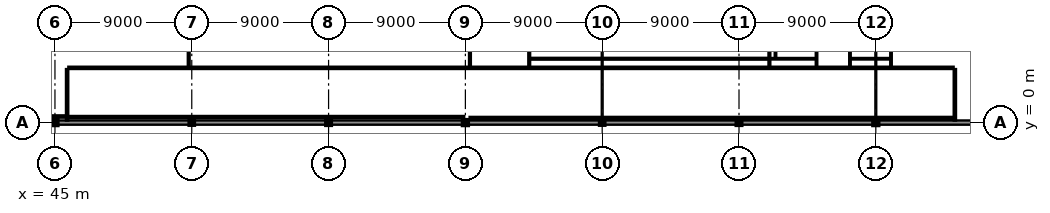
"""IFC4 building model, lengths in metres.
Left out: names, types, materials, properties, quantities, classifications, styles, units other than length and angle.
Written with IfcOpenShell. Run it as: python <this file> out.ifc"""

import sys

from ifc_helpers import new_model, si_unit, direction, frame, frame_2d, origin, origin_2d, place, context, subcontext, project, spatial, rectangle, i_section, extrude, element, fill, save


model = new_model("IFC4")
c1 = context("Model", 3, precision=1e-05, world=origin(), true_north=direction((0.0, 1.0)))
c2 = subcontext(c1, "Body", "Model", "MODEL_VIEW")
j1 = project(units=[si_unit("LENGTHUNIT", "METRE"), si_unit("PLANEANGLEUNIT", "RADIAN")], contexts=[c1])
p1 = place(None, origin())
s1 = spatial("IfcSite", under=j1, at=p1, CompositionType="ELEMENT")
p2 = place(p1, origin())
s2 = spatial("IfcBuilding", under=s1, at=p2, CompositionType="ELEMENT")
p3 = place(p2, frame((0.0, 0.0, 31.4)))
s3 = spatial("IfcBuildingStorey", under=s2, at=p3, CompositionType="ELEMENT", Elevation=31.4)
p4 = place(p3, frame((45.0, 0.0, 0.0), z_axis=(0.0, 0.0, 1.0), x_axis=(0.0, 1.0, 0.0)))
e1 = element("IfcColumn", 1, at=p4, inside=s3, PredefinedType="COLUMN", context=c2, shape_type="SweptSolid", body=[
    extrude(i_section(OverallWidth=0.3, OverallDepth=0.3, WebThickness=0.011, FlangeThickness=0.019, at=origin_2d()), origin(), (0.0, 0.0, 1.0), 4.0),
])
p5 = place(p3, frame((54.0, 0.0, 0.0), z_axis=(0.0, 0.0, 1.0), x_axis=(1.0, 0.0, 0.0)))
e2 = element("IfcColumn", 2, at=p5, inside=s3, PredefinedType="COLUMN", context=c2, shape_type="SweptSolid", body=[
    extrude(i_section(OverallWidth=0.26, OverallDepth=0.26, WebThickness=0.01, FlangeThickness=0.018, at=origin_2d()), origin(), (0.0, 0.0, 1.0), 4.0),
])
p6 = place(p3, frame((63.0, 0.0, 0.0), z_axis=(0.0, 0.0, 1.0), x_axis=(1.0, 0.0, 0.0)))
e3 = element("IfcColumn", 3, at=p6, inside=s3, PredefinedType="COLUMN", context=c2, shape_type="SweptSolid", body=[
    extrude(i_section(OverallWidth=0.28, OverallDepth=0.28, WebThickness=0.01, FlangeThickness=0.018, at=origin_2d()), origin(), (0.0, 0.0, 1.0), 4.0),
])
p7 = place(p3, frame((72.0, 0.0, 0.0), z_axis=(0.0, 0.0, 1.0), x_axis=(1.0, 0.0, 0.0)))
e4 = element("IfcColumn", 4, at=p7, inside=s3, PredefinedType="COLUMN", context=c2, shape_type="SweptSolid", body=[
    extrude(i_section(OverallWidth=0.3, OverallDepth=0.3, WebThickness=0.011, FlangeThickness=0.019, at=origin_2d()), origin(), (0.0, 0.0, 1.0), 4.0),
])
p8 = place(p3, frame((81.0, 0.0, 0.0), z_axis=(0.0, 0.0, 1.0), x_axis=(1.0, 0.0, 0.0)))
e5 = element("IfcColumn", 5, at=p8, inside=s3, PredefinedType="COLUMN", context=c2, shape_type="SweptSolid", body=[
    extrude(i_section(OverallWidth=0.26, OverallDepth=0.26, WebThickness=0.01, FlangeThickness=0.018, at=origin_2d()), origin(), (0.0, 0.0, 1.0), 4.0),
])
p9 = place(p3, frame((90.0, 0.0, 0.0), z_axis=(0.0, 0.0, 1.0), x_axis=(0.0, 1.0, 0.0)))
e6 = element("IfcColumn", 6, at=p9, inside=s3, PredefinedType="COLUMN", context=c2, shape_type="SweptSolid", body=[
    extrude(i_section(OverallWidth=0.28, OverallDepth=0.28, WebThickness=0.01, FlangeThickness=0.018, at=origin_2d()), origin(), (0.0, 0.0, 1.0), 4.0),
])
p10 = place(p3, frame((99.0, 0.0, 0.0), z_axis=(0.0, 0.0, 1.0), x_axis=(1.0, 0.0, 0.0)))
e7 = element("IfcColumn", 7, at=p10, inside=s3, PredefinedType="COLUMN", context=c2, shape_type="SweptSolid", body=[
    extrude(i_section(OverallWidth=0.3, OverallDepth=0.3, WebThickness=0.011, FlangeThickness=0.019, at=origin_2d()), origin(), (0.0, 0.0, 1.0), 4.0),
])
p11 = place(p3, frame((35.99, 0.0, 0.0), z_axis=(0.0, 0.0, 1.0), x_axis=(1.0, 0.0, 0.0)))
e8 = element("IfcWall", 8, at=p11, inside=s3, PredefinedType="SOLIDWALL", context=c2, shape_type="SweptSolid", body=[
    extrude(rectangle(XDim=8.862, YDim=0.28, at=frame_2d((4.431, 0.0))), origin(), (0.0, 0.0, 1.0), 2.787),
])
p12 = place(p3, frame((45.148, 0.0, 0.0), z_axis=(0.0, 0.0, 1.0), x_axis=(1.0, 0.0, 0.0)))
e9 = element("IfcWall", 9, at=p12, inside=s3, PredefinedType="SOLIDWALL", context=c2, shape_type="SweptSolid", body=[
    extrude(rectangle(XDim=8.844, YDim=0.28, at=frame_2d((4.422, 0.0))), origin(), (0.0, 0.0, 1.0), 2.787),
])
p13 = place(p12, frame((2.003, 0.0, 1.05)))
e10 = element("IfcOpeningElement", 10, at=p13, cuts=e9, PredefinedType="OPENING", context=c2, shape_type="SweptSolid", body=[
    extrude(rectangle(XDim=1.3, YDim=1.3, at=frame_2d((0.65, 0.65))), frame((0.0, 0.155, 0.0), z_axis=(0.0, -1.0, 0.0), x_axis=(1.0, 0.0, 0.0)), (0.0, 0.0, 1.0), 0.31),
])
p14 = place(p12, frame((5.541, 0.0, 1.05)))
e11 = element("IfcOpeningElement", 11, at=p14, cuts=e9, PredefinedType="OPENING", context=c2, shape_type="SweptSolid", body=[
    extrude(rectangle(XDim=1.3, YDim=1.3, at=frame_2d((0.65, 0.65))), frame((0.0, 0.155, 0.0), z_axis=(0.0, -1.0, 0.0), x_axis=(1.0, 0.0, 0.0)), (0.0, 0.0, 1.0), 0.31),
])
p15 = place(p3, frame((54.008, 0.0, 0.0), z_axis=(0.0, 0.0, 1.0), x_axis=(1.0, 0.0, 0.0)))
e12 = element("IfcWall", 12, at=p15, inside=s3, PredefinedType="SOLIDWALL", context=c2, shape_type="SweptSolid", body=[
    extrude(rectangle(XDim=8.984, YDim=0.28, at=frame_2d((4.492, 0.0))), origin(), (0.0, 0.0, 1.0), 2.787),
])
p16 = place(p15, frame((2.045, 0.0, 1.05)))
e13 = element("IfcOpeningElement", 13, at=p16, cuts=e12, PredefinedType="OPENING", context=c2, shape_type="SweptSolid", body=[
    extrude(rectangle(XDim=1.3, YDim=1.3, at=frame_2d((0.65, 0.65))), frame((0.0, 0.155, 0.0), z_axis=(0.0, -1.0, 0.0), x_axis=(1.0, 0.0, 0.0)), (0.0, 0.0, 1.0), 0.31),
])
p17 = place(p15, frame((5.639, 0.0, 1.05)))
e14 = element("IfcOpeningElement", 14, at=p17, cuts=e12, PredefinedType="OPENING", context=c2, shape_type="SweptSolid", body=[
    extrude(rectangle(XDim=1.3, YDim=1.3, at=frame_2d((0.65, 0.65))), frame((0.0, 0.155, 0.0), z_axis=(0.0, -1.0, 0.0), x_axis=(1.0, 0.0, 0.0)), (0.0, 0.0, 1.0), 0.31),
])
p18 = place(p3, frame((63.008, 0.0, 0.0), z_axis=(0.0, 0.0, 1.0), x_axis=(1.0, 0.0, 0.0)))
e15 = element("IfcWall", 15, at=p18, inside=s3, PredefinedType="SOLIDWALL", context=c2, shape_type="SweptSolid", body=[
    extrude(rectangle(XDim=8.984, YDim=0.28, at=frame_2d((4.492, 0.0))), origin(), (0.0, 0.0, 1.0), 2.787),
])
p19 = place(p18, frame((2.045, 0.0, 1.05)))
e16 = element("IfcOpeningElement", 16, at=p19, cuts=e15, PredefinedType="OPENING", context=c2, shape_type="SweptSolid", body=[
    extrude(rectangle(XDim=1.3, YDim=1.3, at=frame_2d((0.65, 0.65))), frame((0.0, 0.155, 0.0), z_axis=(0.0, -1.0, 0.0), x_axis=(1.0, 0.0, 0.0)), (0.0, 0.0, 1.0), 0.31),
])
p20 = place(p18, frame((5.639, 0.0, 1.05)))
e17 = element("IfcOpeningElement", 17, at=p20, cuts=e15, PredefinedType="OPENING", context=c2, shape_type="SweptSolid", body=[
    extrude(rectangle(XDim=1.3, YDim=1.3, at=frame_2d((0.65, 0.65))), frame((0.0, 0.155, 0.0), z_axis=(0.0, -1.0, 0.0), x_axis=(1.0, 0.0, 0.0)), (0.0, 0.0, 1.0), 0.31),
])
p21 = place(p3, frame((72.008, 0.0, 0.0), z_axis=(0.0, 0.0, 1.0), x_axis=(1.0, 0.0, 0.0)))
e18 = element("IfcWall", 18, at=p21, inside=s3, PredefinedType="SOLIDWALL", context=c2, shape_type="SweptSolid", body=[
    extrude(rectangle(XDim=8.934, YDim=0.28, at=frame_2d((4.467, 0.0))), origin(), (0.0, 0.0, 1.0), 3.355),
])
p22 = place(p21, frame((2.03, 0.0, 1.05)))
e19 = element("IfcOpeningElement", 19, at=p22, cuts=e18, PredefinedType="OPENING", context=c2, shape_type="SweptSolid", body=[
    extrude(rectangle(XDim=1.3, YDim=1.3, at=frame_2d((0.65, 0.65))), frame((0.0, 0.155, 0.0), z_axis=(0.0, -1.0, 0.0), x_axis=(1.0, 0.0, 0.0)), (0.0, 0.0, 1.0), 0.31),
])
p23 = place(p21, frame((5.604, 0.0, 1.05)))
e20 = element("IfcOpeningElement", 20, at=p23, cuts=e18, PredefinedType="OPENING", context=c2, shape_type="SweptSolid", body=[
    extrude(rectangle(XDim=1.3, YDim=1.3, at=frame_2d((0.65, 0.65))), frame((0.0, 0.155, 0.0), z_axis=(0.0, -1.0, 0.0), x_axis=(1.0, 0.0, 0.0)), (0.0, 0.0, 1.0), 0.31),
])
p24 = place(p3, frame((81.058, 0.0, 0.0), z_axis=(0.0, 0.0, 1.0), x_axis=(1.0, 0.0, 0.0)))
e21 = element("IfcWall", 21, at=p24, inside=s3, PredefinedType="SOLIDWALL", context=c2, shape_type="SweptSolid", body=[
    extrude(rectangle(XDim=8.804, YDim=0.28, at=frame_2d((4.402, 0.0))), origin(), (0.0, 0.0, 1.0), 3.355),
])
p25 = place(p24, frame((1.991, 0.0, 1.05)))
e22 = element("IfcOpeningElement", 22, at=p25, cuts=e21, PredefinedType="OPENING", context=c2, shape_type="SweptSolid", body=[
    extrude(rectangle(XDim=1.3, YDim=1.3, at=frame_2d((0.65, 0.65))), frame((0.0, 0.155, 0.0), z_axis=(0.0, -1.0, 0.0), x_axis=(1.0, 0.0, 0.0)), (0.0, 0.0, 1.0), 0.31),
])
p26 = place(p24, frame((5.513, 0.0, 1.05)))
e23 = element("IfcOpeningElement", 23, at=p26, cuts=e21, PredefinedType="OPENING", context=c2, shape_type="SweptSolid", body=[
    extrude(rectangle(XDim=1.3, YDim=1.3, at=frame_2d((0.65, 0.65))), frame((0.0, 0.155, 0.0), z_axis=(0.0, -1.0, 0.0), x_axis=(1.0, 0.0, 0.0)), (0.0, 0.0, 1.0), 0.31),
])
p27 = place(p3, frame((90.138, 0.0, 0.0), z_axis=(0.0, 0.0, 1.0), x_axis=(1.0, 0.0, 0.0)))
e24 = element("IfcWall", 24, at=p27, inside=s3, PredefinedType="SOLIDWALL", context=c2, shape_type="SweptSolid", body=[
    extrude(rectangle(XDim=8.804, YDim=0.28, at=frame_2d((4.402, 0.0))), origin(), (0.0, 0.0, 1.0), 3.355),
])
p28 = place(p27, frame((1.991, 0.0, 1.05)))
e25 = element("IfcOpeningElement", 25, at=p28, cuts=e24, PredefinedType="OPENING", context=c2, shape_type="SweptSolid", body=[
    extrude(rectangle(XDim=1.3, YDim=1.3, at=frame_2d((0.65, 0.65))), frame((0.0, 0.155, 0.0), z_axis=(0.0, -1.0, 0.0), x_axis=(1.0, 0.0, 0.0)), (0.0, 0.0, 1.0), 0.31),
])
p29 = place(p27, frame((5.513, 0.0, 1.05)))
e26 = element("IfcOpeningElement", 26, at=p29, cuts=e24, PredefinedType="OPENING", context=c2, shape_type="SweptSolid", body=[
    extrude(rectangle(XDim=1.3, YDim=1.3, at=frame_2d((0.65, 0.65))), frame((0.0, 0.155, 0.0), z_axis=(0.0, -1.0, 0.0), x_axis=(1.0, 0.0, 0.0)), (0.0, 0.0, 1.0), 0.31),
])
p30 = place(p3, frame((99.058, 0.0, 0.0), z_axis=(0.0, 0.0, 1.0), x_axis=(1.0, 0.0, 0.0)))
e27 = element("IfcWall", 27, at=p30, inside=s3, PredefinedType="SOLIDWALL", context=c2, shape_type="SweptSolid", body=[
    extrude(rectangle(XDim=8.934, YDim=0.28, at=frame_2d((4.467, 0.0))), origin(), (0.0, 0.0, 1.0), 3.355),
])
p31 = place(p30, frame((2.03, 0.0, 1.05)))
e28 = element("IfcOpeningElement", 28, at=p31, cuts=e27, PredefinedType="OPENING", context=c2, shape_type="SweptSolid", body=[
    extrude(rectangle(XDim=1.3, YDim=1.3, at=frame_2d((0.65, 0.65))), frame((0.0, 0.155, 0.0), z_axis=(0.0, -1.0, 0.0), x_axis=(1.0, 0.0, 0.0)), (0.0, 0.0, 1.0), 0.31),
])
p32 = place(p30, frame((5.604, 0.0, 1.05)))
e29 = element("IfcOpeningElement", 29, at=p32, cuts=e27, PredefinedType="OPENING", context=c2, shape_type="SweptSolid", body=[
    extrude(rectangle(XDim=1.3, YDim=1.3, at=frame_2d((0.65, 0.65))), frame((0.0, 0.155, 0.0), z_axis=(0.0, -1.0, 0.0), x_axis=(1.0, 0.0, 0.0)), (0.0, 0.0, 1.0), 0.31),
])
p33 = place(p3, frame((71.92, 0.36, 0.0), z_axis=(0.0, 0.0, 1.0), x_axis=(-1.0, 0.0, 0.0)))
e30 = element("IfcWall", 30, at=p33, inside=s3, PredefinedType="PARTITIONING", context=c2, shape_type="SweptSolid", body=[
    extrude(rectangle(XDim=26.04, YDim=0.15, at=frame_2d((13.02, 0.0))), origin(), (0.0, 0.0, 1.0), 3.64),
])
p34 = place(p3, frame((45.8, 0.135, 0.0), z_axis=(0.0, 0.0, 1.0), x_axis=(0.0, 1.0, 0.0)))
e31 = element("IfcWall", 31, at=p34, inside=s3, PredefinedType="PARTITIONING", context=c2, shape_type="SweptSolid", body=[
    extrude(rectangle(XDim=3.385, YDim=0.15, at=frame_2d((1.692, 0.0))), origin(), (0.0, 0.0, 1.0), 3.64),
])
p35 = place(p3, frame((45.88, 3.6, 0.0), z_axis=(0.0, 0.0, 1.0), x_axis=(1.0, 0.0, 0.0)))
e32 = element("IfcWall", 32, at=p35, inside=s3, PredefinedType="PARTITIONING", context=c2, shape_type="SweptSolid", body=[
    extrude(rectangle(XDim=58.24, YDim=0.15, at=frame_2d((29.12, 0.0))), origin(), (0.0, 0.0, 1.0), 3.64),
])
p36 = place(p35, frame((27.795, 0.0, 0.0)))
e33 = element("IfcOpeningElement", 33, at=p36, cuts=e32, PredefinedType="OPENING", context=c2, shape_type="SweptSolid", body=[
    extrude(rectangle(XDim=1.05, YDim=2.25, at=frame_2d((0.525, 1.125))), frame((0.0, 0.09, 0.0), z_axis=(0.0, -1.0, 0.0), x_axis=(1.0, 0.0, 0.0)), (0.0, 0.0, 1.0), 0.18),
])
p37 = place(p3, frame((104.2, 3.52, 0.0), z_axis=(0.0, 0.0, 1.0), x_axis=(0.0, -1.0, 0.0)))
e34 = element("IfcWall", 34, at=p37, inside=s3, PredefinedType="PARTITIONING", context=c2, shape_type="SweptSolid", body=[
    extrude(rectangle(XDim=3.385, YDim=0.15, at=frame_2d((1.692, 0.0))), origin(), (0.0, 0.0, 1.0), 3.64),
])
p38 = place(p3, frame((104.13, 0.3, 0.0), z_axis=(0.0, 0.0, 1.0), x_axis=(-1.0, 0.0, 0.0)))
e35 = element("IfcWall", 35, at=p38, inside=s3, PredefinedType="PARTITIONING", context=c2, shape_type="SweptSolid", body=[
    extrude(rectangle(XDim=31.851, YDim=0.15, at=frame_2d((15.925, 0.0))), origin(), (0.0, 0.0, 1.0), 3.64),
])
p39 = place(p3, frame((53.8, 12.62, 0.0), z_axis=(0.0, 0.0, 1.0), x_axis=(0.0, -1.0, 0.0)))
e36 = element("IfcWall", 36, at=p39, inside=s3, PredefinedType="PARTITIONING", context=c2, shape_type="SweptSolid", body=[
    extrude(rectangle(XDim=8.95, YDim=0.12, at=frame_2d((4.475, 0.0))), origin(), (0.0, 0.0, 1.0), 3.355),
])
p40 = place(p3, frame((45.73, 0.4, 0.0), z_axis=(0.0, 0.0, 1.0), x_axis=(-1.0, 0.0, 0.0)))
e37 = element("IfcWall", 37, at=p40, inside=s3, PredefinedType="PARTITIONING", context=c2, shape_type="SweptSolid", body=[
    extrude(rectangle(XDim=13.195, YDim=0.15, at=frame_2d((6.598, 0.0))), origin(), (0.0, 0.0, 1.0), 3.64),
])
p41 = place(p3, frame((72.3, 11.42, 0.0), z_axis=(0.0, 0.0, 1.0), x_axis=(0.0, -1.0, 0.0)))
e38 = element("IfcWall", 38, at=p41, inside=s3, PredefinedType="PARTITIONING", context=c2, shape_type="SweptSolid", body=[
    extrude(rectangle(XDim=7.75, YDim=0.12, at=frame_2d((3.875, 0.0))), origin(), (0.0, 0.0, 1.0), 3.64),
])
p42 = place(p41, frame((3.425, 0.0, 0.0)))
e39 = element("IfcOpeningElement", 39, at=p42, cuts=e38, PredefinedType="OPENING", context=c2, shape_type="SweptSolid", body=[
    extrude(rectangle(XDim=0.9, YDim=2.1, at=frame_2d((0.45, 1.05))), frame((0.0, 0.075, 0.0), z_axis=(0.0, -1.0, 0.0), x_axis=(1.0, 0.0, 0.0)), (0.0, 0.0, 1.0), 0.15),
])
p43 = place(p3, frame((91.92, 4.2, 0.0), z_axis=(0.0, 0.0, 1.0), x_axis=(-1.0, 0.0, 0.0)))
e40 = element("IfcWall", 40, at=p43, inside=s3, PredefinedType="PARTITIONING", context=c2, shape_type="SweptSolid", body=[
    extrude(rectangle(XDim=15.64, YDim=0.12, at=frame_2d((7.82, 0.0))), origin(), (0.0, 0.0, 1.0), 3.64),
])
for number, where, z_axis, x_axis in (
    (41, (76.2, 3.67, 0.0), (0.0, 0.0, 1.0), (0.0, 1.0, 0.0)),
    (42, (92.0, 15.32, 0.0), (0.0, 0.0, 1.0), (0.0, -1.0, 0.0)),
):
    element("IfcWall", number, at=place(p3, frame(where, z_axis=z_axis, x_axis=x_axis)), inside=s3, PredefinedType="PARTITIONING", context=c2, shape_type="SweptSolid", body=[
        extrude(rectangle(XDim=11.65, YDim=0.12, at=frame_2d((5.825, 0.0))), origin(), (0.0, 0.0, 1.0), 3.64),
    ])
p44 = place(p3, frame((95.02, 4.2, 0.0), z_axis=(0.0, 0.0, 1.0), x_axis=(-1.0, 0.0, 0.0)))
e43 = element("IfcWall", 43, at=p44, inside=s3, PredefinedType="PARTITIONING", context=c2, shape_type="SweptSolid", body=[
    extrude(rectangle(XDim=2.965, YDim=0.1, at=frame_2d((1.482, 0.0))), origin(), (0.0, 0.0, 1.0), 3.64),
])
p45 = place(p3, frame((92.4, 4.245, 0.0), z_axis=(0.0, 0.0, 1.0), x_axis=(0.0, 1.0, 0.0)))
e44 = element("IfcWall", 44, at=p45, inside=s3, PredefinedType="PARTITIONING", context=c2, shape_type="SweptSolid", body=[
    extrude(rectangle(XDim=5.475, YDim=0.1, at=frame_2d((2.737, 0.0))), origin(), (0.0, 0.0, 1.0), 3.64),
])
p46 = place(p3, frame((95.1, 9.72, 0.0), z_axis=(0.0, 0.0, 1.0), x_axis=(0.0, -1.0, 0.0)))
e45 = element("IfcWall", 45, at=p46, inside=s3, PredefinedType="PARTITIONING", context=c2, shape_type="SweptSolid", body=[
    extrude(rectangle(XDim=6.05, YDim=0.1, at=frame_2d((3.025, 0.0))), origin(), (0.0, 0.0, 1.0), 3.64),
])
p47 = place(p46, frame((2.529, 0.0, 0.0)))
e46 = element("IfcOpeningElement", 46, at=p47, cuts=e45, PredefinedType="OPENING", context=c2, shape_type="SweptSolid", body=[
    extrude(rectangle(XDim=0.9, YDim=2.05, at=frame_2d((0.45, 1.025))), frame((0.0, 0.065, 0.0), z_axis=(0.0, -1.0, 0.0), x_axis=(1.0, 0.0, 0.0)), (0.0, 0.0, 1.0), 0.13),
])
p48 = place(p3, frame((100.0, 9.62, 0.0), z_axis=(0.0, 0.0, 1.0), x_axis=(0.0, -1.0, 0.0)))
e47 = element("IfcWall", 47, at=p48, inside=s3, PredefinedType="PARTITIONING", context=c2, shape_type="SweptSolid", body=[
    extrude(rectangle(XDim=5.95, YDim=0.1, at=frame_2d((2.975, 0.0))), origin(), (0.0, 0.0, 1.0), 3.64),
])
p49 = place(p3, frame((99.955, 4.2, 0.0), z_axis=(0.0, 0.0, 1.0), x_axis=(-1.0, 0.0, 0.0)))
e48 = element("IfcWall", 48, at=p49, inside=s3, PredefinedType="PARTITIONING", context=c2, shape_type="SweptSolid", body=[
    extrude(rectangle(XDim=2.575, YDim=0.1, at=frame_2d((1.288, 0.0))), origin(), (0.0, 0.0, 1.0), 3.64),
])
p50 = place(p3, frame((97.3, 3.67, 0.0), z_axis=(0.0, 0.0, 1.0), x_axis=(0.0, 1.0, 0.0)))
e49 = element("IfcWall", 49, at=p50, inside=s3, PredefinedType="PARTITIONING", context=c2, shape_type="SweptSolid", body=[
    extrude(rectangle(XDim=5.95, YDim=0.1, at=frame_2d((2.975, 0.0))), origin(), (0.0, 0.0, 1.0), 3.64),
])
p51 = place(p50, frame((2.571, 0.0, 0.0)))
e50 = element("IfcOpeningElement", 50, at=p51, cuts=e49, PredefinedType="OPENING", context=c2, shape_type="SweptSolid", body=[
    extrude(rectangle(XDim=0.9, YDim=2.05, at=frame_2d((0.45, 1.025))), frame((0.0, 0.065, 0.0), z_axis=(0.0, -1.0, 0.0), x_axis=(1.0, 0.0, 0.0)), (0.0, 0.0, 1.0), 0.13),
])
p52 = place(p13, origin())
e51 = element("IfcWindow", 51, at=p52, inside=s3, PartitioningType="SINGLE_PANEL", PredefinedType="WINDOW", context=c2, shape_type="SweptSolid", body=[
    extrude(rectangle(XDim=1.3, YDim=1.3, at=frame_2d((0.65, 0.65))), frame((0.0, 0.03, 0.0), z_axis=(0.0, -1.0, 0.0), x_axis=(1.0, 0.0, 0.0)), (0.0, 0.0, 1.0), 0.06),
])
fill(e10, e51)
p53 = place(p14, origin())
e52 = element("IfcWindow", 52, at=p53, inside=s3, PartitioningType="SINGLE_PANEL", PredefinedType="WINDOW", context=c2, shape_type="SweptSolid", body=[
    extrude(rectangle(XDim=1.3, YDim=1.3, at=frame_2d((0.65, 0.65))), frame((0.0, 0.03, 0.0), z_axis=(0.0, -1.0, 0.0), x_axis=(1.0, 0.0, 0.0)), (0.0, 0.0, 1.0), 0.06),
])
fill(e11, e52)
p54 = place(p16, origin())
e53 = element("IfcWindow", 53, at=p54, inside=s3, PartitioningType="SINGLE_PANEL", PredefinedType="WINDOW", context=c2, shape_type="SweptSolid", body=[
    extrude(rectangle(XDim=1.3, YDim=1.3, at=frame_2d((0.65, 0.65))), frame((0.0, 0.03, 0.0), z_axis=(0.0, -1.0, 0.0), x_axis=(1.0, 0.0, 0.0)), (0.0, 0.0, 1.0), 0.06),
])
fill(e13, e53)
p55 = place(p17, origin())
e54 = element("IfcWindow", 54, at=p55, inside=s3, PartitioningType="SINGLE_PANEL", PredefinedType="WINDOW", context=c2, shape_type="SweptSolid", body=[
    extrude(rectangle(XDim=1.3, YDim=1.3, at=frame_2d((0.65, 0.65))), frame((0.0, 0.03, 0.0), z_axis=(0.0, -1.0, 0.0), x_axis=(1.0, 0.0, 0.0)), (0.0, 0.0, 1.0), 0.06),
])
fill(e14, e54)
p56 = place(p19, origin())
e55 = element("IfcWindow", 55, at=p56, inside=s3, PartitioningType="SINGLE_PANEL", PredefinedType="WINDOW", context=c2, shape_type="SweptSolid", body=[
    extrude(rectangle(XDim=1.3, YDim=1.3, at=frame_2d((0.65, 0.65))), frame((0.0, 0.03, 0.0), z_axis=(0.0, -1.0, 0.0), x_axis=(1.0, 0.0, 0.0)), (0.0, 0.0, 1.0), 0.06),
])
fill(e16, e55)
p57 = place(p20, origin())
e56 = element("IfcWindow", 56, at=p57, inside=s3, PartitioningType="SINGLE_PANEL", PredefinedType="WINDOW", context=c2, shape_type="SweptSolid", body=[
    extrude(rectangle(XDim=1.3, YDim=1.3, at=frame_2d((0.65, 0.65))), frame((0.0, 0.03, 0.0), z_axis=(0.0, -1.0, 0.0), x_axis=(1.0, 0.0, 0.0)), (0.0, 0.0, 1.0), 0.06),
])
fill(e17, e56)
p58 = place(p22, origin())
e57 = element("IfcWindow", 57, at=p58, inside=s3, PartitioningType="SINGLE_PANEL", PredefinedType="WINDOW", context=c2, shape_type="SweptSolid", body=[
    extrude(rectangle(XDim=1.3, YDim=1.3, at=frame_2d((0.65, 0.65))), frame((0.0, 0.03, 0.0), z_axis=(0.0, -1.0, 0.0), x_axis=(1.0, 0.0, 0.0)), (0.0, 0.0, 1.0), 0.06),
])
fill(e19, e57)
p59 = place(p23, origin())
e58 = element("IfcWindow", 58, at=p59, inside=s3, PartitioningType="SINGLE_PANEL", PredefinedType="WINDOW", context=c2, shape_type="SweptSolid", body=[
    extrude(rectangle(XDim=1.3, YDim=1.3, at=frame_2d((0.65, 0.65))), frame((0.0, 0.03, 0.0), z_axis=(0.0, -1.0, 0.0), x_axis=(1.0, 0.0, 0.0)), (0.0, 0.0, 1.0), 0.06),
])
fill(e20, e58)
p60 = place(p25, origin())
e59 = element("IfcWindow", 59, at=p60, inside=s3, PartitioningType="SINGLE_PANEL", PredefinedType="WINDOW", context=c2, shape_type="SweptSolid", body=[
    extrude(rectangle(XDim=1.3, YDim=1.3, at=frame_2d((0.65, 0.65))), frame((0.0, 0.03, 0.0), z_axis=(0.0, -1.0, 0.0), x_axis=(1.0, 0.0, 0.0)), (0.0, 0.0, 1.0), 0.06),
])
fill(e22, e59)
p61 = place(p26, origin())
e60 = element("IfcWindow", 60, at=p61, inside=s3, PartitioningType="SINGLE_PANEL", PredefinedType="WINDOW", context=c2, shape_type="SweptSolid", body=[
    extrude(rectangle(XDim=1.3, YDim=1.3, at=frame_2d((0.65, 0.65))), frame((0.0, 0.03, 0.0), z_axis=(0.0, -1.0, 0.0), x_axis=(1.0, 0.0, 0.0)), (0.0, 0.0, 1.0), 0.06),
])
fill(e23, e60)
p62 = place(p28, origin())
e61 = element("IfcWindow", 61, at=p62, inside=s3, PartitioningType="SINGLE_PANEL", PredefinedType="WINDOW", context=c2, shape_type="SweptSolid", body=[
    extrude(rectangle(XDim=1.3, YDim=1.3, at=frame_2d((0.65, 0.65))), frame((0.0, 0.03, 0.0), z_axis=(0.0, -1.0, 0.0), x_axis=(1.0, 0.0, 0.0)), (0.0, 0.0, 1.0), 0.06),
])
fill(e25, e61)
p63 = place(p29, origin())
e62 = element("IfcWindow", 62, at=p63, inside=s3, PartitioningType="SINGLE_PANEL", PredefinedType="WINDOW", context=c2, shape_type="SweptSolid", body=[
    extrude(rectangle(XDim=1.3, YDim=1.3, at=frame_2d((0.65, 0.65))), frame((0.0, 0.03, 0.0), z_axis=(0.0, -1.0, 0.0), x_axis=(1.0, 0.0, 0.0)), (0.0, 0.0, 1.0), 0.06),
])
fill(e26, e62)
p64 = place(p31, origin())
e63 = element("IfcWindow", 63, at=p64, inside=s3, PartitioningType="SINGLE_PANEL", PredefinedType="WINDOW", context=c2, shape_type="SweptSolid", body=[
    extrude(rectangle(XDim=1.3, YDim=1.3, at=frame_2d((0.65, 0.65))), frame((0.0, 0.03, 0.0), z_axis=(0.0, -1.0, 0.0), x_axis=(1.0, 0.0, 0.0)), (0.0, 0.0, 1.0), 0.06),
])
fill(e28, e63)
p65 = place(p32, origin())
e64 = element("IfcWindow", 64, at=p65, inside=s3, PartitioningType="SINGLE_PANEL", PredefinedType="WINDOW", context=c2, shape_type="SweptSolid", body=[
    extrude(rectangle(XDim=1.3, YDim=1.3, at=frame_2d((0.65, 0.65))), frame((0.0, 0.03, 0.0), z_axis=(0.0, -1.0, 0.0), x_axis=(1.0, 0.0, 0.0)), (0.0, 0.0, 1.0), 0.06),
])
fill(e29, e64)
p66 = place(p36, frame((1.05, 0.0, 0.0), z_axis=(0.0, 0.0, 1.0), x_axis=(-1.0, 0.0, 0.0)))
e65 = element("IfcDoor", 65, at=p66, inside=s3, OperationType="SINGLE_SWING_RIGHT", PredefinedType="DOOR", context=c2, shape_type="SweptSolid", body=[
    extrude(rectangle(XDim=1.05, YDim=2.25, at=frame_2d((0.525, 1.125))), frame((0.0, 0.025, 0.0), z_axis=(0.0, -1.0, 0.0), x_axis=(1.0, 0.0, 0.0)), (0.0, 0.0, 1.0), 0.05),
])
fill(e33, e65)
save(model, sys.argv[1])
